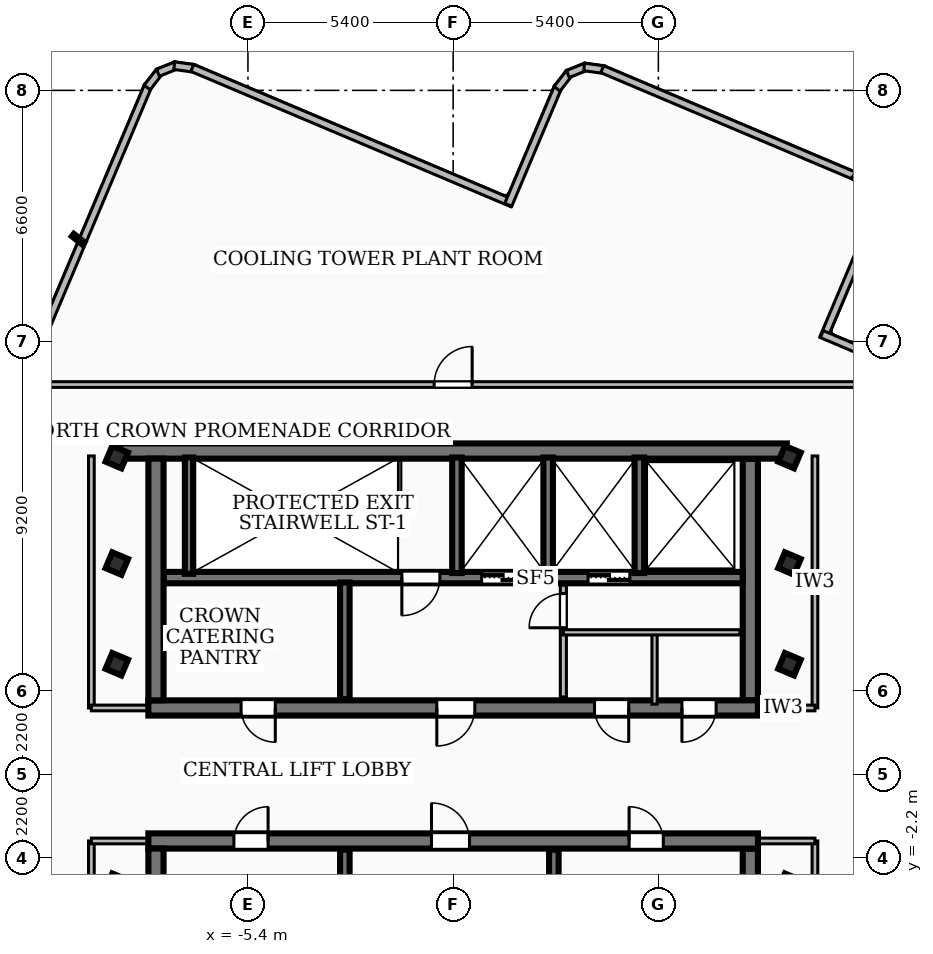
"""IFC4 building model, lengths in metres.
Left out: names, types, materials, properties, quantities, classifications, styles, units other than length and angle.
Written with IfcOpenShell. Run it as: python <this file> out.ifc"""

import sys

from ifc_helpers import new_model, si_unit, direction, frame, frame_2d, origin, origin_2d, place, context, subcontext, project, spatial, rectangle, hollow_rectangle, extrude, element, fill, save


model = new_model("IFC4")
c1 = context("Model", 3, precision=1e-05, world=origin(), true_north=direction((0.0, 1.0)))
c2 = subcontext(c1, "Body", "Model", "MODEL_VIEW")
j1 = project(units=[si_unit("LENGTHUNIT", "METRE"), si_unit("PLANEANGLEUNIT", "RADIAN")], contexts=[c1])
p1 = place(None, origin())
s1 = spatial("IfcSite", under=j1, at=p1, CompositionType="ELEMENT")
p2 = place(p1, origin())
s2 = spatial("IfcBuilding", under=s1, at=p2, CompositionType="ELEMENT")
p3 = place(p2, frame((0.0, 0.0, 301.68)))
s3 = spatial("IfcBuildingStorey", under=s2, at=p3, CompositionType="ELEMENT", Elevation=301.68)
p4 = place(p3, frame((-8.78, 8.51, 0.0), z_axis=(0.0, 0.0, 1.0), x_axis=(1.0, 0.0, 0.0)))
e1 = element("IfcWall", 1, at=p4, inside=s3, PredefinedType="SHEAR", context=c2, shape_type="SweptSolid", body=[
    extrude(rectangle(XDim=17.56, YDim=0.4, at=frame_2d((8.78, 0.0))), origin(), (0.0, 0.0, 1.0), 3.89),
])
p5 = place(p3, frame((8.02, 1.75, 0.0), z_axis=(0.0, 0.0, 1.0), x_axis=(-1.0, 0.0, 0.0)))
e2 = element("IfcWall", 2, at=p5, inside=s3, PredefinedType="SHEAR", context=c2, shape_type="SweptSolid", body=[
    extrude(rectangle(XDim=16.04, YDim=0.4, at=frame_2d((8.02, 0.0))), origin(), (0.0, 0.0, 1.0), 3.89),
])
p6 = place(p5, frame((7.45, 0.0, 0.0)))
e3 = element("IfcOpeningElement", 3, at=p6, cuts=e2, PredefinedType="OPENING", context=c2, shape_type="SweptSolid", body=[
    extrude(rectangle(XDim=1.0, YDim=2.1, at=frame_2d((0.5, 1.05))), frame((0.0, 0.21, 0.0), z_axis=(0.0, -1.0, 0.0), x_axis=(1.0, 0.0, 0.0)), (0.0, 0.0, 1.0), 0.42),
])
p7 = place(p5, frame((12.7, 0.0, 0.0)))
e4 = element("IfcOpeningElement", 4, at=p7, cuts=e2, PredefinedType="OPENING", context=c2, shape_type="SweptSolid", body=[
    extrude(rectangle(XDim=0.9, YDim=2.06, at=frame_2d((0.45, 1.03))), frame((0.0, 0.21, 0.0), z_axis=(0.0, -1.0, 0.0), x_axis=(1.0, 0.0, 0.0)), (0.0, 0.0, 1.0), 0.42),
])
p8 = place(p5, frame((3.4, 0.0, 0.0)))
e5 = element("IfcOpeningElement", 5, at=p8, cuts=e2, PredefinedType="OPENING", context=c2, shape_type="SweptSolid", body=[
    extrude(rectangle(XDim=0.9, YDim=2.06, at=frame_2d((0.45, 1.03))), frame((0.0, 0.21, 0.0), z_axis=(0.0, -1.0, 0.0), x_axis=(1.0, 0.0, 0.0)), (0.0, 0.0, 1.0), 0.42),
])
p9 = place(p5, frame((1.1, 0.0, 0.0)))
e6 = element("IfcOpeningElement", 6, at=p9, cuts=e2, PredefinedType="OPENING", context=c2, shape_type="SweptSolid", body=[
    extrude(rectangle(XDim=0.9, YDim=2.06, at=frame_2d((0.45, 1.03))), frame((0.0, 0.21, 0.0), z_axis=(0.0, -1.0, 0.0), x_axis=(1.0, 0.0, 0.0)), (0.0, 0.0, 1.0), 0.42),
])
for number, where, z_axis, x_axis in (
    (7, (-7.82, 1.95, 0.0), (0.0, 0.0, 1.0), (0.0, 1.0, 0.0)),
    (8, (7.82, 8.31, 0.0), (0.0, 0.0, 1.0), (0.0, -1.0, 0.0)),
):
    element("IfcWall", number, at=place(p3, frame(where, z_axis=z_axis, x_axis=x_axis)), inside=s3, PredefinedType="SHEAR", context=c2, shape_type="SweptSolid", body=[
        extrude(rectangle(XDim=6.36, YDim=0.4, at=frame_2d((3.18, 0.0))), origin(), (0.0, 0.0, 1.0), 3.89),
    ])
p10 = place(p3, frame((7.62, 5.18, 0.0), z_axis=(0.0, 0.0, 1.0), x_axis=(-1.0, 0.0, 0.0)))
e9 = element("IfcWall", 9, at=p10, inside=s3, PredefinedType="SOLIDWALL", context=c2, shape_type="SweptSolid", body=[
    extrude(rectangle(XDim=15.24, YDim=0.3, at=frame_2d((7.62, 0.0))), origin(), (0.0, 0.0, 1.0), 3.89),
])
p11 = place(p10, frame((5.77, 0.0, 0.0)))
e10 = element("IfcOpeningElement", 10, at=p11, cuts=e9, PredefinedType="OPENING", context=c2, shape_type="SweptSolid", body=[
    extrude(rectangle(XDim=1.1, YDim=2.15, at=frame_2d((0.55, 1.075))), frame((0.0, 0.16, 0.0), z_axis=(0.0, -1.0, 0.0), x_axis=(1.0, 0.0, 0.0)), (0.0, 0.0, 1.0), 0.32),
])
p12 = place(p10, frame((2.97, 0.0, 0.0)))
e11 = element("IfcOpeningElement", 11, at=p12, cuts=e9, PredefinedType="OPENING", context=c2, shape_type="SweptSolid", body=[
    extrude(rectangle(XDim=1.1, YDim=2.15, at=frame_2d((0.55, 1.075))), frame((0.0, 0.16, 0.0), z_axis=(0.0, -1.0, 0.0), x_axis=(1.0, 0.0, 0.0)), (0.0, 0.0, 1.0), 0.32),
])
p13 = place(p10, frame((7.97, 0.0, 0.0)))
e12 = element("IfcOpeningElement", 12, at=p13, cuts=e9, PredefinedType="OPENING", context=c2, shape_type="SweptSolid", body=[
    extrude(rectangle(XDim=1.0, YDim=2.1, at=frame_2d((0.5, 1.05))), frame((0.0, 0.16, 0.0), z_axis=(0.0, -1.0, 0.0), x_axis=(1.0, 0.0, 0.0)), (0.0, 0.0, 1.0), 0.32),
])
p14 = place(p3, frame((-8.02, -1.75, 0.0), z_axis=(0.0, 0.0, 1.0), x_axis=(1.0, 0.0, 0.0)))
e13 = element("IfcWall", 13, at=p14, inside=s3, PredefinedType="SHEAR", context=c2, shape_type="SweptSolid", body=[
    extrude(rectangle(XDim=16.04, YDim=0.4, at=frame_2d((8.02, 0.0))), origin(), (0.0, 0.0, 1.0), 3.89),
])
p15 = place(p14, frame((7.45, 0.0, 0.0)))
e14 = element("IfcOpeningElement", 14, at=p15, cuts=e13, PredefinedType="OPENING", context=c2, shape_type="SweptSolid", body=[
    extrude(rectangle(XDim=1.0, YDim=2.1, at=frame_2d((0.5, 1.05))), frame((0.0, 0.21, 0.0), z_axis=(0.0, -1.0, 0.0), x_axis=(1.0, 0.0, 0.0)), (0.0, 0.0, 1.0), 0.42),
])
p16 = place(p14, frame((12.65, 0.0, 0.0)))
e15 = element("IfcOpeningElement", 15, at=p16, cuts=e13, PredefinedType="OPENING", context=c2, shape_type="SweptSolid", body=[
    extrude(rectangle(XDim=0.9, YDim=2.06, at=frame_2d((0.45, 1.03))), frame((0.0, 0.21, 0.0), z_axis=(0.0, -1.0, 0.0), x_axis=(1.0, 0.0, 0.0)), (0.0, 0.0, 1.0), 0.42),
])
p17 = place(p14, frame((2.25, 0.0, 0.0)))
e16 = element("IfcOpeningElement", 16, at=p17, cuts=e13, PredefinedType="OPENING", context=c2, shape_type="SweptSolid", body=[
    extrude(rectangle(XDim=0.9, YDim=2.06, at=frame_2d((0.45, 1.03))), frame((0.0, 0.21, 0.0), z_axis=(0.0, -1.0, 0.0), x_axis=(1.0, 0.0, 0.0)), (0.0, 0.0, 1.0), 0.42),
])
for number, where, z_axis, x_axis in (
    (17, (-7.82, -8.31, 0.0), (0.0, 0.0, 1.0), (0.0, 1.0, 0.0)),
    (18, (7.82, -1.95, 0.0), (0.0, 0.0, 1.0), (0.0, -1.0, 0.0)),
):
    element("IfcWall", number, at=place(p3, frame(where, z_axis=z_axis, x_axis=x_axis)), inside=s3, PredefinedType="SHEAR", context=c2, shape_type="SweptSolid", body=[
        extrude(rectangle(XDim=6.36, YDim=0.4, at=frame_2d((3.18, 0.0))), origin(), (0.0, 0.0, 1.0), 3.89),
    ])
p18 = place(p3, frame((-6.95, 5.28, 0.0), z_axis=(0.0, 0.0, 1.0), x_axis=(0.0, 1.0, 0.0)))
e19 = element("IfcWall", 19, at=p18, inside=s3, PredefinedType="SOLIDWALL", context=c2, shape_type="SweptSolid", body=[
    extrude(rectangle(XDim=3.06, YDim=0.22, at=frame_2d((1.53, 0.0))), origin(), (0.0, 0.0, 1.0), 3.89),
])
for number, where, z_axis, x_axis in (
    (20, (0.1, 5.3, 0.0), (0.0, 0.0, 1.0), (0.0, 1.0, 0.0)),
    (21, (2.5, 5.3, 0.0), (0.0, 0.0, 1.0), (0.0, 1.0, 0.0)),
    (22, (4.9, 5.3, 0.0), (0.0, 0.0, 1.0), (0.0, 1.0, 0.0)),
):
    element("IfcWall", number, at=place(p3, frame(where, z_axis=z_axis, x_axis=x_axis)), inside=s3, PredefinedType="SOLIDWALL", context=c2, shape_type="SweptSolid", body=[
        extrude(rectangle(XDim=3.04, YDim=0.25, at=frame_2d((1.52, 0.0))), origin(), (0.0, 0.0, 1.0), 3.89),
    ])
for number, where, z_axis, x_axis in (
    (23, (-2.85, 1.98, 0.0), (0.0, 0.0, 1.0), (0.0, 1.0, 0.0)),
    (24, (-2.85, -5.05, 0.0), (0.0, 0.0, 1.0), (0.0, 1.0, 0.0)),
    (25, (2.65, -5.05, 0.0), (0.0, 0.0, 1.0), (0.0, 1.0, 0.0)),
):
    element("IfcWall", number, at=place(p3, frame(where, z_axis=z_axis, x_axis=x_axis)), inside=s3, PredefinedType="SOLIDWALL", context=c2, shape_type="SweptSolid", body=[
        extrude(rectangle(XDim=3.07, YDim=0.25, at=frame_2d((1.535, 0.0))), origin(), (0.0, 0.0, 1.0), 3.89),
    ])
for number, where, z_axis, x_axis in (
    (26, (-8.85, -2.9, 0.0), (0.0, 0.0, 1.0), (0.389, 0.921, 0.0)),
    (27, (-8.85, 2.9, 0.0), (0.0, 0.0, 1.0), (0.389, 0.921, 0.0)),
    (28, (-8.85, 5.55, 0.0), (0.0, 0.0, 1.0), (0.389, 0.921, 0.0)),
    (29, (8.85, -2.9, 0.0), (0.0, 0.0, 1.0), (0.389, 0.921, 0.0)),
    (30, (8.85, 2.9, 0.0), (0.0, 0.0, 1.0), (0.389, 0.921, 0.0)),
    (31, (8.85, 5.55, 0.0), (0.0, 0.0, 1.0), (0.389, 0.921, 0.0)),
    (32, (-8.85, 8.35, 0.0), (0.0, 0.0, 1.0), (0.389, 0.921, 0.0)),
    (33, (8.85, 8.35, 0.0), (0.0, 0.0, 1.0), (0.389, 0.921, 0.0)),
):
    element("IfcColumn", number, at=place(p3, frame(where, z_axis=z_axis, x_axis=x_axis)), inside=s3, PredefinedType="COLUMN", context=c2, shape_type="SweptSolid", body=[
        extrude(hollow_rectangle(XDim=0.45, YDim=0.45, WallThickness=0.022, at=origin_2d()), origin(), (0.0, 0.0, 1.0), 4.14),
    ])
p19 = place(p3, frame((-11.481, 9.952, 0.0), z_axis=(0.0, 0.0, 1.0), x_axis=(0.389505259475, 0.92102424118, 0.0)))
e34 = element("IfcWall", 34, at=p19, inside=s3, PredefinedType="SOLIDWALL", context=c2, shape_type="SweptSolid", body=[
    extrude(rectangle(XDim=8.867, YDim=0.2, at=frame_2d((4.434, 0.0))), origin(), (0.0, 0.0, 1.0), 3.89),
])
p20 = place(p3, frame((-8.052, 18.076, 0.0), z_axis=(0.0, 0.0, 1.0), x_axis=(0.613266470563, 0.789876089069, 0.0)))
e35 = element("IfcWall", 35, at=p20, inside=s3, PredefinedType="SOLIDWALL", context=c2, shape_type="SweptSolid", body=[
    extrude(rectangle(XDim=0.527, YDim=0.2, at=frame_2d((0.263, 0.0))), origin(), (0.0, 0.0, 1.0), 3.89),
])
p21 = place(p3, frame((-7.767, 18.463, 0.0), z_axis=(0.0, 0.0, 1.0), x_axis=(0.926663227271, 0.375892621934, 0.0)))
e36 = element("IfcWall", 36, at=p21, inside=s3, PredefinedType="SOLIDWALL", context=c2, shape_type="SweptSolid", body=[
    extrude(rectangle(XDim=0.514, YDim=0.2, at=frame_2d((0.257, 0.0))), origin(), (0.0, 0.0, 1.0), 3.89),
])
p22 = place(p3, frame((-7.339, 18.65, 0.0), z_axis=(0.0, 0.0, 1.0), x_axis=(0.99065777357, -0.136371462064, 0.0)))
e37 = element("IfcWall", 37, at=p22, inside=s3, PredefinedType="SOLIDWALL", context=c2, shape_type="SweptSolid", body=[
    extrude(rectangle(XDim=0.528, YDim=0.2, at=frame_2d((0.264, 0.0))), origin(), (0.0, 0.0, 1.0), 3.89),
])
p23 = place(p3, frame((-6.864, 18.591, 0.0), z_axis=(0.0, 0.0, 1.0), x_axis=(0.921076334879, -0.389382055732, 0.0)))
e38 = element("IfcWall", 38, at=p23, inside=s3, PredefinedType="SOLIDWALL", context=c2, shape_type="SweptSolid", body=[
    extrude(rectangle(XDim=9.14, YDim=0.2, at=frame_2d((4.57, 0.0))), origin(), (0.0, 0.0, 1.0), 3.89),
])
p24 = place(p3, frame((1.45, 14.989, 0.0), z_axis=(0.0, 0.0, 1.0), x_axis=(0.38945279818, 0.921046425535, 0.0)))
e39 = element("IfcWall", 39, at=p24, inside=s3, PredefinedType="SOLIDWALL", context=c2, shape_type="SweptSolid", body=[
    extrude(rectangle(XDim=3.361, YDim=0.2, at=frame_2d((1.681, 0.0))), origin(), (0.0, 0.0, 1.0), 3.89),
])
p25 = place(p3, frame((2.734, 18.042, 0.0), z_axis=(0.0, 0.0, 1.0), x_axis=(0.613812609302, 0.789451759554, 0.0)))
e40 = element("IfcWall", 40, at=p25, inside=s3, PredefinedType="SOLIDWALL", context=c2, shape_type="SweptSolid", body=[
    extrude(rectangle(XDim=0.528, YDim=0.2, at=frame_2d((0.264, 0.0))), origin(), (0.0, 0.0, 1.0), 3.89),
])
p26 = place(p3, frame((3.02, 18.43, 0.0), z_axis=(0.0, 0.0, 1.0), x_axis=(0.927324374452, 0.37425860651, 0.0)))
e41 = element("IfcWall", 41, at=p26, inside=s3, PredefinedType="SOLIDWALL", context=c2, shape_type="SweptSolid", body=[
    extrude(rectangle(XDim=0.513, YDim=0.2, at=frame_2d((0.257, 0.0))), origin(), (0.0, 0.0, 1.0), 3.89),
])
p27 = place(p3, frame((3.448, 18.616, 0.0), z_axis=(0.0, 0.0, 1.0), x_axis=(0.990897604992, -0.134617741855, 0.0)))
e42 = element("IfcWall", 42, at=p27, inside=s3, PredefinedType="SOLIDWALL", context=c2, shape_type="SweptSolid", body=[
    extrude(rectangle(XDim=0.528, YDim=0.2, at=frame_2d((0.264, 0.0))), origin(), (0.0, 0.0, 1.0), 3.89),
])
p28 = place(p3, frame((3.923, 18.558, 0.0), z_axis=(0.0, 0.0, 1.0), x_axis=(0.920979837259, -0.389610240319, 0.0)))
e43 = element("IfcWall", 43, at=p28, inside=s3, PredefinedType="SOLIDWALL", context=c2, shape_type="SweptSolid", body=[
    extrude(rectangle(XDim=7.228, YDim=0.2, at=frame_2d((3.614, 0.0))), origin(), (0.0, 0.0, 1.0), 3.89),
])
p29 = place(p3, frame((10.537, 15.767, 0.0), z_axis=(0.0, 0.0, 1.0), x_axis=(0.790571904838, -0.61236922137, 0.0)))
e44 = element("IfcWall", 44, at=p29, inside=s3, PredefinedType="SOLIDWALL", context=c2, shape_type="SweptSolid", body=[
    extrude(rectangle(XDim=0.527, YDim=0.2, at=frame_2d((0.264, 0.0))), origin(), (0.0, 0.0, 1.0), 3.89),
])
p30 = place(p3, frame((11.052, 14.579, 0.0), z_axis=(0.0, 0.0, 1.0), x_axis=(-0.389322570858, -0.921101479654, 0.0)))
e45 = element("IfcWall", 45, at=p30, inside=s3, PredefinedType="SOLIDWALL", context=c2, shape_type="SweptSolid", body=[
    extrude(rectangle(XDim=3.363, YDim=0.2, at=frame_2d((1.681, 0.0))), origin(), (0.0, 0.0, 1.0), 3.89),
])
p31 = place(p3, frame((9.7, 11.587, 0.0), z_axis=(0.0, 0.0, 1.0), x_axis=(0.921047594323, -0.389450034011, 0.0)))
e46 = element("IfcWall", 46, at=p31, inside=s3, PredefinedType="SOLIDWALL", context=c2, shape_type="SweptSolid", body=[
    extrude(rectangle(XDim=9.141, YDim=0.2, at=frame_2d((4.57, 0.0))), origin(), (0.0, 0.0, 1.0), 3.89),
])
p32 = place(p3, frame((2.9, 2.04, 0.0), z_axis=(0.0, 0.0, 1.0), x_axis=(0.0, 1.0, 0.0)))
e47 = element("IfcWall", 47, at=p32, inside=s3, PredefinedType="PARTITIONING", context=c2, shape_type="SweptSolid", body=[
    extrude(rectangle(XDim=2.94, YDim=0.16, at=frame_2d((1.47, 0.0))), origin(), (0.0, 0.0, 1.0), 3.27),
])
p33 = place(p32, frame((1.82, 0.0, 0.0)))
e48 = element("IfcOpeningElement", 48, at=p33, cuts=e47, PredefinedType="OPENING", context=c2, shape_type="SweptSolid", body=[
    extrude(rectangle(XDim=0.9, YDim=2.06, at=frame_2d((0.45, 1.03))), frame((0.0, 0.09, 0.0), z_axis=(0.0, -1.0, 0.0), x_axis=(1.0, 0.0, 0.0)), (0.0, 0.0, 1.0), 0.18),
])
p34 = place(p3, frame((2.9, 3.74, 0.0), z_axis=(0.0, 0.0, 1.0), x_axis=(1.0, 0.0, 0.0)))
e49 = element("IfcWall", 49, at=p34, inside=s3, PredefinedType="PARTITIONING", context=c2, shape_type="SweptSolid", body=[
    extrude(rectangle(XDim=4.65, YDim=0.138, at=frame_2d((2.325, 0.0))), origin(), (0.0, 0.0, 1.0), 3.89),
])
p35 = place(p3, frame((5.3, 1.85, 0.0), z_axis=(0.0, 0.0, 1.0), x_axis=(0.0, 1.0, 0.0)))
e50 = element("IfcWall", 50, at=p35, inside=s3, PredefinedType="PARTITIONING", context=c2, shape_type="SweptSolid", body=[
    extrude(rectangle(XDim=1.89, YDim=0.138, at=frame_2d((0.945, 0.0))), origin(), (0.0, 0.0, 1.0), 3.27),
])
p36 = place(p3, frame((-9.52, 1.75, 0.0), z_axis=(0.0, 0.0, 1.0), x_axis=(0.0, 1.0, 0.0)))
e51 = element("IfcWall", 51, at=p36, inside=s3, PredefinedType="PARTITIONING", context=c2, shape_type="SweptSolid", body=[
    extrude(rectangle(XDim=6.63, YDim=0.15, at=frame_2d((3.315, 0.0))), origin(), (0.0, 0.0, 1.0), 3.26),
])
p37 = place(p3, frame((-7.85, 1.75, 0.0), z_axis=(0.0, 0.0, 1.0), x_axis=(-1.0, 0.0, 0.0)))
e52 = element("IfcWall", 52, at=p37, inside=s3, PredefinedType="PARTITIONING", context=c2, shape_type="SweptSolid", body=[
    extrude(rectangle(XDim=1.67, YDim=0.15, at=frame_2d((0.835, 0.0))), origin(), (0.0, 0.0, 1.0), 3.26),
])
p38 = place(p3, frame((-9.52, -8.38, 0.0), z_axis=(0.0, 0.0, 1.0), x_axis=(0.0, 1.0, 0.0)))
e53 = element("IfcWall", 53, at=p38, inside=s3, PredefinedType="PARTITIONING", context=c2, shape_type="SweptSolid", body=[
    extrude(rectangle(XDim=6.63, YDim=0.15, at=frame_2d((3.315, 0.0))), origin(), (0.0, 0.0, 1.0), 3.89),
])
p39 = place(p3, frame((-7.85, -1.75, 0.0), z_axis=(0.0, 0.0, 1.0), x_axis=(-1.0, 0.0, 0.0)))
e54 = element("IfcWall", 54, at=p39, inside=s3, PredefinedType="PARTITIONING", context=c2, shape_type="SweptSolid", body=[
    extrude(rectangle(XDim=1.67, YDim=0.15, at=frame_2d((0.835, 0.0))), origin(), (0.0, 0.0, 1.0), 3.27),
])
p40 = place(p3, frame((9.52, 1.75, 0.0), z_axis=(0.0, 0.0, 1.0), x_axis=(0.0, 1.0, 0.0)))
e55 = element("IfcWall", 55, at=p40, inside=s3, PredefinedType="PARTITIONING", context=c2, shape_type="SweptSolid", body=[
    extrude(rectangle(XDim=6.63, YDim=0.15, at=frame_2d((3.315, 0.0))), origin(), (0.0, 0.0, 1.0), 3.89),
])
p41 = place(p3, frame((7.85, 1.75, 0.0), z_axis=(0.0, 0.0, 1.0), x_axis=(1.0, 0.0, 0.0)))
e56 = element("IfcWall", 56, at=p41, inside=s3, PredefinedType="PARTITIONING", context=c2, shape_type="SweptSolid", body=[
    extrude(rectangle(XDim=1.67, YDim=0.15, at=frame_2d((0.835, 0.0))), origin(), (0.0, 0.0, 1.0), 3.27),
])
p42 = place(p3, frame((9.52, -8.38, 0.0), z_axis=(0.0, 0.0, 1.0), x_axis=(0.0, 1.0, 0.0)))
e57 = element("IfcWall", 57, at=p42, inside=s3, PredefinedType="PARTITIONING", context=c2, shape_type="SweptSolid", body=[
    extrude(rectangle(XDim=6.63, YDim=0.15, at=frame_2d((3.315, 0.0))), origin(), (0.0, 0.0, 1.0), 3.26),
])
p43 = place(p3, frame((7.85, -1.75, 0.0), z_axis=(0.0, 0.0, 1.0), x_axis=(1.0, 0.0, 0.0)))
e58 = element("IfcWall", 58, at=p43, inside=s3, PredefinedType="PARTITIONING", context=c2, shape_type="SweptSolid", body=[
    extrude(rectangle(XDim=1.67, YDim=0.15, at=frame_2d((0.835, 0.0))), origin(), (0.0, 0.0, 1.0), 3.27),
])
p44 = place(p3, frame((-11.28, 10.26, 0.0), z_axis=(0.0, 0.0, 1.0), x_axis=(1.0, 0.0, 0.0)))
e59 = element("IfcWall", 59, at=p44, inside=s3, PredefinedType="PARTITIONING", context=c2, shape_type="SweptSolid", body=[
    extrude(rectangle(XDim=23.952, YDim=0.15, at=frame_2d((11.976, 0.0))), origin(), (0.0, 0.0, 1.0), 3.26),
])
p45 = place(p44, frame((10.78, 0.0, 0.0)))
e60 = element("IfcOpeningElement", 60, at=p45, cuts=e59, PredefinedType="OPENING", context=c2, shape_type="SweptSolid", body=[
    extrude(rectangle(XDim=1.0, YDim=2.1, at=frame_2d((0.5, 1.05))), frame((0.0, 0.085, 0.0), z_axis=(0.0, -1.0, 0.0), x_axis=(1.0, 0.0, 0.0)), (0.0, 0.0, 1.0), 0.17),
])
p46 = place(p6, origin())
e61 = element("IfcDoor", 61, at=p46, inside=s3, OperationType="SINGLE_SWING_RIGHT", PredefinedType="DOOR", context=c2, shape_type="SweptSolid", body=[
    extrude(rectangle(XDim=1.0, YDim=2.1, at=frame_2d((0.5, 1.05))), frame((0.0, 0.025, 0.0), z_axis=(0.0, -1.0, 0.0), x_axis=(1.0, 0.0, 0.0)), (0.0, 0.0, 1.0), 0.05),
])
fill(e3, e61)
p47 = place(p15, origin())
e62 = element("IfcDoor", 62, at=p47, inside=s3, OperationType="SINGLE_SWING_LEFT", PredefinedType="DOOR", context=c2, shape_type="SweptSolid", body=[
    extrude(rectangle(XDim=1.0, YDim=2.1, at=frame_2d((0.5, 1.05))), frame((0.0, 0.025, 0.0), z_axis=(0.0, -1.0, 0.0), x_axis=(1.0, 0.0, 0.0)), (0.0, 0.0, 1.0), 0.05),
])
fill(e14, e62)
p48 = place(p11, origin())
e63 = element("IfcDoor", 63, at=p48, inside=s3, OperationType="DOUBLE_DOOR_SLIDING", PredefinedType="DOOR", context=c2, shape_type="SweptSolid", body=[
    extrude(rectangle(XDim=1.1, YDim=2.15, at=frame_2d((0.55, 1.075))), frame((0.0, 0.025, 0.0), z_axis=(0.0, -1.0, 0.0), x_axis=(1.0, 0.0, 0.0)), (0.0, 0.0, 1.0), 0.05),
])
fill(e10, e63)
p49 = place(p12, origin())
e64 = element("IfcDoor", 64, at=p49, inside=s3, OperationType="DOUBLE_DOOR_SLIDING", PredefinedType="DOOR", context=c2, shape_type="SweptSolid", body=[
    extrude(rectangle(XDim=1.1, YDim=2.15, at=frame_2d((0.55, 1.075))), frame((0.0, 0.025, 0.0), z_axis=(0.0, -1.0, 0.0), x_axis=(1.0, 0.0, 0.0)), (0.0, 0.0, 1.0), 0.05),
])
fill(e11, e64)
p50 = place(p13, origin())
e65 = element("IfcDoor", 65, at=p50, inside=s3, OperationType="SINGLE_SWING_RIGHT", PredefinedType="DOOR", context=c2, shape_type="SweptSolid", body=[
    extrude(rectangle(XDim=1.0, YDim=2.1, at=frame_2d((0.5, 1.05))), frame((0.0, 0.025, 0.0), z_axis=(0.0, -1.0, 0.0), x_axis=(1.0, 0.0, 0.0)), (0.0, 0.0, 1.0), 0.05),
])
fill(e12, e65)
p51 = place(p7, origin())
e66 = element("IfcDoor", 66, at=p51, inside=s3, OperationType="SINGLE_SWING_LEFT", PredefinedType="DOOR", context=c2, shape_type="SweptSolid", body=[
    extrude(rectangle(XDim=0.9, YDim=2.06, at=frame_2d((0.45, 1.03))), frame((0.0, 0.025, 0.0), z_axis=(0.0, -1.0, 0.0), x_axis=(1.0, 0.0, 0.0)), (0.0, 0.0, 1.0), 0.05),
])
fill(e4, e66)
p52 = place(p16, origin())
e67 = element("IfcDoor", 67, at=p52, inside=s3, OperationType="SINGLE_SWING_LEFT", PredefinedType="DOOR", context=c2, shape_type="SweptSolid", body=[
    extrude(rectangle(XDim=0.9, YDim=2.06, at=frame_2d((0.45, 1.03))), frame((0.0, 0.025, 0.0), z_axis=(0.0, -1.0, 0.0), x_axis=(1.0, 0.0, 0.0)), (0.0, 0.0, 1.0), 0.05),
])
fill(e15, e67)
p53 = place(p17, origin())
e68 = element("IfcDoor", 68, at=p53, inside=s3, OperationType="SINGLE_SWING_RIGHT", PredefinedType="DOOR", context=c2, shape_type="SweptSolid", body=[
    extrude(rectangle(XDim=0.9, YDim=2.06, at=frame_2d((0.45, 1.03))), frame((0.0, 0.025, 0.0), z_axis=(0.0, -1.0, 0.0), x_axis=(1.0, 0.0, 0.0)), (0.0, 0.0, 1.0), 0.05),
])
fill(e16, e68)
p54 = place(p8, origin())
e69 = element("IfcDoor", 69, at=p54, inside=s3, OperationType="SINGLE_SWING_LEFT", PredefinedType="DOOR", context=c2, shape_type="SweptSolid", body=[
    extrude(rectangle(XDim=0.9, YDim=2.06, at=frame_2d((0.45, 1.03))), frame((0.0, 0.025, 0.0), z_axis=(0.0, -1.0, 0.0), x_axis=(1.0, 0.0, 0.0)), (0.0, 0.0, 1.0), 0.05),
])
fill(e5, e69)
p55 = place(p9, origin())
e70 = element("IfcDoor", 70, at=p55, inside=s3, OperationType="SINGLE_SWING_RIGHT", PredefinedType="DOOR", context=c2, shape_type="SweptSolid", body=[
    extrude(rectangle(XDim=0.9, YDim=2.06, at=frame_2d((0.45, 1.03))), frame((0.0, 0.025, 0.0), z_axis=(0.0, -1.0, 0.0), x_axis=(1.0, 0.0, 0.0)), (0.0, 0.0, 1.0), 0.05),
])
fill(e6, e70)
p56 = place(p33, origin())
e71 = element("IfcDoor", 71, at=p56, inside=s3, OperationType="SINGLE_SWING_LEFT", PredefinedType="DOOR", context=c2, shape_type="SweptSolid", body=[
    extrude(rectangle(XDim=0.9, YDim=2.06, at=frame_2d((0.45, 1.03))), frame((0.0, 0.025, 0.0), z_axis=(0.0, -1.0, 0.0), x_axis=(1.0, 0.0, 0.0)), (0.0, 0.0, 1.0), 0.05),
])
fill(e48, e71)
p57 = place(p45, origin())
e72 = element("IfcDoor", 72, at=p57, inside=s3, OperationType="SINGLE_SWING_RIGHT", PredefinedType="DOOR", context=c2, shape_type="SweptSolid", body=[
    extrude(rectangle(XDim=1.0, YDim=2.1, at=frame_2d((0.5, 1.05))), frame((0.0, 0.025, 0.0), z_axis=(0.0, -1.0, 0.0), x_axis=(1.0, 0.0, 0.0)), (0.0, 0.0, 1.0), 0.05),
])
fill(e60, e72)
save(model, sys.argv[1])
